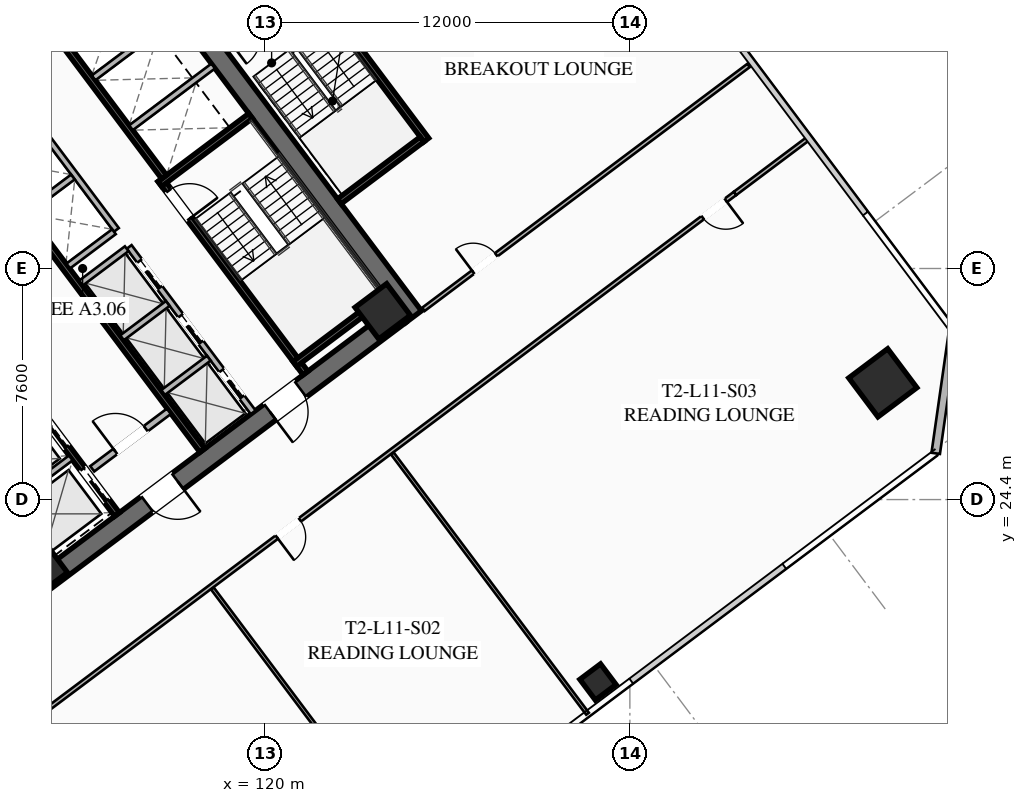
"""IFC4 building model, lengths in metres.
Left out: names, types, materials, properties, quantities, classifications, styles, units other than length and angle.
Written with IfcOpenShell. Run it as: python <this file> out.ifc"""

import sys

from ifc_helpers import new_model, si_unit, direction, frame, frame_2d, origin, origin_2d, place, context, subcontext, project, spatial, rectangle, hollow_rectangle, extrude, element, fill, save


model = new_model("IFC4")
c1 = context("Model", 3, precision=1e-05, world=origin(), true_north=direction((0.0, 1.0)))
c2 = subcontext(c1, "Body", "Model", "MODEL_VIEW")
j1 = project(units=[si_unit("LENGTHUNIT", "METRE"), si_unit("PLANEANGLEUNIT", "RADIAN")], contexts=[c1])
p1 = place(None, origin())
s1 = spatial("IfcSite", under=j1, at=p1, CompositionType="ELEMENT")
p2 = place(p1, origin())
s2 = spatial("IfcBuilding", under=s1, at=p2, CompositionType="ELEMENT")
p3 = place(p2, frame((0.0, 0.0, 45.9)))
s3 = spatial("IfcBuildingStorey", under=s2, at=p3, CompositionType="ELEMENT", Elevation=45.9)
p4 = place(p3, frame((115.524, 42.893, 0.0), z_axis=(0.0, 0.0, 1.0), x_axis=(0.600005007985, -0.799996243986, 0.0)))
e1 = element("IfcWall", 1, at=p4, inside=s3, PredefinedType="SHEAR", context=c2, shape_type="SweptSolid", body=[
    extrude(rectangle(XDim=15.6, YDim=0.65, at=frame_2d((7.8, 0.0))), origin(), (0.0, 0.0, 1.0), 3.55),
])
p5 = place(p3, frame((124.429, 30.478, 0.0), z_axis=(0.0, 0.0, 1.0), x_axis=(-0.799998028465, -0.600002628705, 0.0)))
e2 = element("IfcWall", 2, at=p5, inside=s3, PredefinedType="SHEAR", context=c2, shape_type="SweptSolid", body=[
    extrude(rectangle(XDim=14.86, YDim=0.65, at=frame_2d((7.43, 0.0))), origin(), (0.0, 0.0, 1.0), 3.55),
])
p6 = place(p5, frame((9.13, 0.0, 0.0)))
e3 = element("IfcOpeningElement", 3, at=p6, cuts=e2, PredefinedType="OPENING", context=c2, shape_type="SweptSolid", body=[
    extrude(rectangle(XDim=1.25, YDim=2.25, at=frame_2d((0.625, 1.125))), frame((0.0, 0.335, 0.0), z_axis=(0.0, -1.0, 0.0), x_axis=(1.0, 0.0, 0.0)), (0.0, 0.0, 1.0), 0.67),
])
p7 = place(p5, frame((4.08, 0.0, 0.0)))
e4 = element("IfcOpeningElement", 4, at=p7, cuts=e2, PredefinedType="OPENING", context=c2, shape_type="SweptSolid", body=[
    extrude(rectangle(XDim=1.25, YDim=2.25, at=frame_2d((0.625, 1.125))), frame((0.0, 0.335, 0.0), z_axis=(0.0, -1.0, 0.0), x_axis=(1.0, 0.0, 0.0)), (0.0, 0.0, 1.0), 0.67),
])
p8 = place(p3, frame((103.571, 33.522, 0.0), z_axis=(0.0, 0.0, 1.0), x_axis=(0.799998028465, 0.600002628705, 0.0)))
e5 = element("IfcWall", 5, at=p8, inside=s3, PredefinedType="SHEAR", context=c2, shape_type="SweptSolid", body=[
    extrude(rectangle(XDim=14.86, YDim=0.65, at=frame_2d((7.43, 0.0))), origin(), (0.0, 0.0, 1.0), 3.55),
])
p9 = place(p8, frame((4.48, 0.0, 0.0)))
e6 = element("IfcOpeningElement", 6, at=p9, cuts=e5, PredefinedType="OPENING", context=c2, shape_type="SweptSolid", body=[
    extrude(rectangle(XDim=1.25, YDim=2.25, at=frame_2d((0.625, 1.125))), frame((0.0, 0.335, 0.0), z_axis=(0.0, -1.0, 0.0), x_axis=(1.0, 0.0, 0.0)), (0.0, 0.0, 1.0), 0.67),
])
p10 = place(p8, frame((9.53, 0.0, 0.0)))
e7 = element("IfcOpeningElement", 7, at=p10, cuts=e5, PredefinedType="OPENING", context=c2, shape_type="SweptSolid", body=[
    extrude(rectangle(XDim=1.25, YDim=2.25, at=frame_2d((0.625, 1.125))), frame((0.0, 0.335, 0.0), z_axis=(0.0, -1.0, 0.0), x_axis=(1.0, 0.0, 0.0)), (0.0, 0.0, 1.0), 0.67),
])
for number, where, z_axis, x_axis in (
    (8, (112.59, 22.13, 0.0), (0.0, 0.0, 1.0), (0.8, 0.6, 0.0)),
    (9, (123.87, 30.59, 0.0), (0.0, 0.0, 1.0), (0.8, 0.6, 0.0)),
):
    element("IfcColumn", number, at=place(p3, frame(where, z_axis=z_axis, x_axis=x_axis)), inside=s3, PredefinedType="COLUMN", context=c2, shape_type="SweptSolid", body=[
        extrude(hollow_rectangle(XDim=1.3, YDim=1.3, WallThickness=0.05, at=origin_2d()), origin(), (0.0, 0.0, 1.0), 3.35),
    ])
p11 = place(p3, frame((140.32, 28.24, 0.0), z_axis=(0.0, 0.0, 1.0), x_axis=(0.799999996291, 0.600000004945, 0.0)))
e10 = element("IfcColumn", 10, at=p11, inside=s3, PredefinedType="COLUMN", context=c2, shape_type="SweptSolid", body=[
    extrude(hollow_rectangle(XDim=1.6, YDim=1.6, WallThickness=0.06, at=origin_2d()), origin(), (0.0, 0.0, 1.0), 3.35),
])
p12 = place(p3, frame((130.95, 18.4, 0.0), z_axis=(0.0, 0.0, 1.0), x_axis=(0.799999996291, 0.600000004945, 0.0)))
e11 = element("IfcColumn", 11, at=p12, inside=s3, PredefinedType="COLUMN", context=c2, shape_type="SweptSolid", body=[
    extrude(hollow_rectangle(XDim=0.85, YDim=0.85, WallThickness=0.035, at=origin_2d()), origin(), (0.0, 0.0, 1.0), 3.35),
])
p13 = place(p3, frame((142.64, 29.98, 0.0), z_axis=(0.0, 0.0, 1.0), x_axis=(-0.14137968631, -0.989955445613, 0.0)))
e12 = element("IfcWall", 12, at=p13, inside=s3, PredefinedType="SOLIDWALL", context=c2, shape_type="SweptSolid", body=[
    extrude(rectangle(XDim=4.101, YDim=0.28, at=frame_2d((2.051, 0.0))), origin(), (0.0, 0.0, 1.0), 3.35),
])
p14 = place(p3, frame((116.56, 34.92, 0.0), z_axis=(0.0, 0.0, 1.0), x_axis=(0.600009827119, -0.799992629566, 0.0)))
e13 = element("IfcWall", 13, at=p14, inside=s3, PredefinedType="SHEAR", context=c2, shape_type="SweptSolid", body=[
    extrude(rectangle(XDim=7.95, YDim=0.2, at=frame_2d((3.975, 0.0))), origin(), (0.0, 0.0, 1.0), 3.35),
])
p15 = place(p14, frame((0.45, 0.0, 0.0)))
e14 = element("IfcOpeningElement", 14, at=p15, cuts=e13, PredefinedType="OPENING", context=c2, shape_type="SweptSolid", body=[
    extrude(rectangle(XDim=1.15, YDim=2.2, at=frame_2d((0.575, 1.1))), frame((0.0, 0.11, 0.0), z_axis=(0.0, -1.0, 0.0), x_axis=(1.0, 0.0, 0.0)), (0.0, 0.0, 1.0), 0.22),
])
for number, where, z_axis, x_axis in (
    (15, (116.54, 34.78, 0.0), (0.0, 0.0, 1.0), (0.8, 0.6, 0.0)),
    (16, (120.98, 28.86, 0.0), (0.0, 0.0, 1.0), (0.8, 0.6, 0.0)),
):
    element("IfcWall", number, at=place(p3, frame(where, z_axis=z_axis, x_axis=x_axis)), inside=s3, PredefinedType="SHEAR", context=c2, shape_type="SweptSolid", body=[
        extrude(rectangle(XDim=3.73, YDim=0.2, at=frame_2d((1.865, 0.0))), origin(), (0.0, 0.0, 1.0), 3.35),
    ])
p16 = place(p3, frame((117.938, 26.016, 0.0), z_axis=(0.0, 0.0, 1.0), x_axis=(-0.600005463273, 0.799995902516, 0.0)))
e17 = element("IfcWall", 17, at=p16, inside=s3, PredefinedType="SHEAR", context=c2, shape_type="SweptSolid", body=[
    extrude(rectangle(XDim=14.3, YDim=0.2, at=frame_2d((7.15, 0.0))), origin(), (0.0, 0.0, 1.0), 3.35),
])
p17 = place(p3, frame((114.316, 25.412, 0.0), z_axis=(0.0, 0.0, 1.0), x_axis=(0.800018601094, 0.59997519774, 0.0)))
e18 = element("IfcWall", 18, at=p17, inside=s3, PredefinedType="SOLIDWALL", context=c2, shape_type="SweptSolid", body=[
    extrude(rectangle(XDim=3.15, YDim=0.22, at=frame_2d((1.575, 0.0))), origin(), (0.0, 0.0, 1.0), 2.703),
])
p18 = place(p17, frame((0.95, 0.0, 0.0)))
e19 = element("IfcOpeningElement", 19, at=p18, cuts=e18, PredefinedType="OPENING", context=c2, shape_type="SweptSolid", body=[
    extrude(rectangle(XDim=1.25, YDim=2.25, at=frame_2d((0.625, 1.125))), frame((0.0, 0.12, 0.0), z_axis=(0.0, -1.0, 0.0), x_axis=(1.0, 0.0, 0.0)), (0.0, 0.0, 1.0), 0.24),
])
p19 = place(p3, frame((115.13, 23.91, 0.0), z_axis=(0.0, 0.0, 1.0), x_axis=(-0.599975393228, 0.800018454488, 0.0)))
e20 = element("IfcWall", 20, at=p19, inside=s3, PredefinedType="SHEAR", context=c2, shape_type="SweptSolid", body=[
    extrude(rectangle(XDim=6.35, YDim=0.2, at=frame_2d((3.175, 0.0))), origin(), (0.0, 0.0, 1.0), 3.35),
])
p20 = place(p19, frame((4.775, 0.0, 0.0)))
e21 = element("IfcOpeningElement", 21, at=p20, cuts=e20, PredefinedType="OPENING", context=c2, shape_type="SweptSolid", body=[
    extrude(rectangle(XDim=1.3, YDim=2.25, at=frame_2d((0.65, 1.125))), frame((0.0, 0.11, 0.0), z_axis=(0.0, -1.0, 0.0), x_axis=(1.0, 0.0, 0.0)), (0.0, 0.0, 1.0), 0.22),
])
p21 = place(p19, frame((2.775, 0.0, 0.0)))
e22 = element("IfcOpeningElement", 22, at=p21, cuts=e20, PredefinedType="OPENING", context=c2, shape_type="SweptSolid", body=[
    extrude(rectangle(XDim=1.3, YDim=2.25, at=frame_2d((0.65, 1.125))), frame((0.0, 0.11, 0.0), z_axis=(0.0, -1.0, 0.0), x_axis=(1.0, 0.0, 0.0)), (0.0, 0.0, 1.0), 0.22),
])
p22 = place(p19, frame((0.575, 0.0, 0.0)))
e23 = element("IfcOpeningElement", 23, at=p22, cuts=e20, PredefinedType="OPENING", context=c2, shape_type="SweptSolid", body=[
    extrude(rectangle(XDim=1.3, YDim=2.25, at=frame_2d((0.65, 1.125))), frame((0.0, 0.11, 0.0), z_axis=(0.0, -1.0, 0.0), x_axis=(1.0, 0.0, 0.0)), (0.0, 0.0, 1.0), 0.22),
])
p23 = place(p3, frame((110.906, 23.742, 0.0), z_axis=(0.0, 0.0, 1.0), x_axis=(0.8, 0.6, 0.0)))
e24 = element("IfcWall", 24, at=p23, inside=s3, PredefinedType="SOLIDWALL", context=c2, shape_type="SweptSolid", body=[
    extrude(rectangle(XDim=3.38, YDim=0.2, at=frame_2d((1.69, 0.0))), origin(), (0.0, 0.0, 1.0), 3.35),
])
p24 = place(p3, frame((112.87, 40.09, 0.0), z_axis=(0.0, 0.0, 1.0), x_axis=(0.599975393228, -0.800018454488, 0.0)))
e25 = element("IfcWall", 25, at=p24, inside=s3, PredefinedType="SHEAR", context=c2, shape_type="SweptSolid", body=[
    extrude(rectangle(XDim=6.35, YDim=0.2, at=frame_2d((3.175, 0.0))), origin(), (0.0, 0.0, 1.0), 3.35),
])
for number, where, z_axis, x_axis in (
    (26, (115.59, 36.63, 0.0), (0.0, 0.0, 1.0), (0.8, 0.6, 0.0)),
    (27, (114.36, 38.27, 0.0), (0.0, 0.0, 1.0), (0.8, 0.6, 0.0)),
):
    element("IfcWall", number, at=place(p3, frame(where, z_axis=z_axis, x_axis=x_axis)), inside=s3, PredefinedType="SOLIDWALL", context=c2, shape_type="SweptSolid", body=[
        extrude(rectangle(XDim=3.38, YDim=0.2, at=frame_2d((1.69, 0.0))), origin(), (0.0, 0.0, 1.0), 3.35),
    ])
p25 = place(p3, frame((119.61, 27.27, 0.0), z_axis=(0.0, 0.0, 1.0), x_axis=(-0.600011488909, 0.79999138319, 0.0)))
e28 = element("IfcWall", 28, at=p25, inside=s3, PredefinedType="SOLIDWALL", context=c2, shape_type="SweptSolid", body=[
    extrude(rectangle(XDim=6.8, YDim=0.2, at=frame_2d((3.4, 0.0))), origin(), (0.0, 0.0, 1.0), 3.35),
])
p26 = place(p25, frame((0.625, 0.0, 0.0)))
e29 = element("IfcOpeningElement", 29, at=p26, cuts=e28, PredefinedType="OPENING", context=c2, shape_type="SweptSolid", body=[
    extrude(rectangle(XDim=1.1, YDim=2.2, at=frame_2d((0.55, 1.1))), frame((0.0, 0.11, 0.0), z_axis=(0.0, -1.0, 0.0), x_axis=(1.0, 0.0, 0.0)), (0.0, 0.0, 1.0), 0.22),
])
p27 = place(p25, frame((2.875, 0.0, 0.0)))
e30 = element("IfcOpeningElement", 30, at=p27, cuts=e28, PredefinedType="OPENING", context=c2, shape_type="SweptSolid", body=[
    extrude(rectangle(XDim=1.1, YDim=2.2, at=frame_2d((0.55, 1.1))), frame((0.0, 0.11, 0.0), z_axis=(0.0, -1.0, 0.0), x_axis=(1.0, 0.0, 0.0)), (0.0, 0.0, 1.0), 0.22),
])
p28 = place(p25, frame((5.125, 0.0, 0.0)))
e31 = element("IfcOpeningElement", 31, at=p28, cuts=e28, PredefinedType="OPENING", context=c2, shape_type="SweptSolid", body=[
    extrude(rectangle(XDim=1.1, YDim=2.2, at=frame_2d((0.55, 1.1))), frame((0.0, 0.11, 0.0), z_axis=(0.0, -1.0, 0.0), x_axis=(1.0, 0.0, 0.0)), (0.0, 0.0, 1.0), 0.22),
])
p29 = place(p3, frame((116.646, 27.922, 0.0), z_axis=(0.0, 0.0, 1.0), x_axis=(0.8, 0.6, 0.0)))
e32 = element("IfcWall", 32, at=p29, inside=s3, PredefinedType="SOLIDWALL", context=c2, shape_type="SweptSolid", body=[
    extrude(rectangle(XDim=1.88, YDim=0.2, at=frame_2d((0.94, 0.0))), origin(), (0.0, 0.0, 1.0), 3.35),
])
p30 = place(p3, frame((115.296, 29.722, 0.0), z_axis=(0.0, 0.0, 1.0), x_axis=(0.799984418148, 0.600020775241, 0.0)))
e33 = element("IfcWall", 33, at=p30, inside=s3, PredefinedType="SOLIDWALL", context=c2, shape_type="SweptSolid", body=[
    extrude(rectangle(XDim=1.88, YDim=0.2, at=frame_2d((0.94, 0.0))), origin(), (0.0, 0.0, 1.0), 3.35),
])
p31 = place(p3, frame((113.946, 31.522, 0.0), z_axis=(0.0, 0.0, 1.0), x_axis=(0.8, 0.6, 0.0)))
e34 = element("IfcWall", 34, at=p31, inside=s3, PredefinedType="SOLIDWALL", context=c2, shape_type="SweptSolid", body=[
    extrude(rectangle(XDim=1.88, YDim=0.2, at=frame_2d((0.94, 0.0))), origin(), (0.0, 0.0, 1.0), 3.35),
])
p32 = place(p3, frame((115.11, 33.27, 0.0), z_axis=(0.0, 0.0, 1.0), x_axis=(-0.600011488909, 0.79999138319, 0.0)))
e35 = element("IfcWall", 35, at=p32, inside=s3, PredefinedType="SOLIDWALL", context=c2, shape_type="SweptSolid", body=[
    extrude(rectangle(XDim=6.8, YDim=0.2, at=frame_2d((3.4, 0.0))), origin(), (0.0, 0.0, 1.0), 3.35),
])
p33 = place(p3, frame((113.526, 32.082, 0.0), z_axis=(0.0, 0.0, 1.0), x_axis=(0.800046745961, 0.599937666993, 0.0)))
e36 = element("IfcWall", 36, at=p33, inside=s3, PredefinedType="SOLIDWALL", context=c2, shape_type="SweptSolid", body=[
    extrude(rectangle(XDim=1.88, YDim=0.2, at=frame_2d((0.94, 0.0))), origin(), (0.0, 0.0, 1.0), 3.35),
])
p34 = place(p3, frame((112.176, 33.882, 0.0), z_axis=(0.0, 0.0, 1.0), x_axis=(0.8, 0.6, 0.0)))
e37 = element("IfcWall", 37, at=p34, inside=s3, PredefinedType="SOLIDWALL", context=c2, shape_type="SweptSolid", body=[
    extrude(rectangle(XDim=1.88, YDim=0.2, at=frame_2d((0.94, 0.0))), origin(), (0.0, 0.0, 1.0), 3.35),
])
p35 = place(p3, frame((125.304, 36.228, 0.0), z_axis=(0.0, 0.0, 1.0), x_axis=(-0.59998851072, 0.800008616831, 0.0)))
e38 = element("IfcWall", 38, at=p35, inside=s3, PredefinedType="SHEAR", context=c2, shape_type="SweptSolid", body=[
    extrude(rectangle(XDim=6.8, YDim=0.2, at=frame_2d((3.4, 0.0))), origin(), (0.0, 0.0, 1.0), 3.35),
])
p36 = place(p3, frame((122.444, 34.208, 0.0), z_axis=(0.0, 0.0, 1.0), x_axis=(0.79999138319, 0.600011488909, 0.0)))
e39 = element("IfcWall", 39, at=p36, inside=s3, PredefinedType="SHEAR", context=c2, shape_type="SweptSolid", body=[
    extrude(rectangle(XDim=3.4, YDim=0.2, at=frame_2d((1.7, 0.0))), origin(), (0.0, 0.0, 1.0), 3.35),
])
p37 = place(p3, frame((98.516, 34.012, 0.0), z_axis=(0.0, 0.0, 1.0), x_axis=(0.799998035726, 0.600002619023, 0.0)))
e40 = element("IfcWall", 40, at=p37, inside=s3, PredefinedType="PARTITIONING", context=c2, shape_type="SweptSolid", body=[
    extrude(rectangle(XDim=29.83, YDim=0.135, at=frame_2d((14.915, 0.0))), origin(), (0.0, 0.0, 1.0), 2.703),
])
p38 = place(p37, frame((0.3, 0.0, 0.0)))
e41 = element("IfcOpeningElement", 41, at=p38, cuts=e40, PredefinedType="OPENING", context=c2, shape_type="SweptSolid", body=[
    extrude(rectangle(XDim=0.95, YDim=2.05, at=frame_2d((0.475, 1.025))), frame((0.0, 0.077, 0.0), z_axis=(0.0, -1.0, 0.0), x_axis=(1.0, 0.0, 0.0)), (0.0, 0.0, 1.0), 0.155),
])
p39 = place(p37, frame((10.835, 0.0, 0.0)))
e42 = element("IfcOpeningElement", 42, at=p39, cuts=e40, PredefinedType="OPENING", context=c2, shape_type="SweptSolid", body=[
    extrude(rectangle(XDim=0.95, YDim=2.05, at=frame_2d((0.475, 1.025))), frame((0.0, 0.077, 0.0), z_axis=(0.0, -1.0, 0.0), x_axis=(1.0, 0.0, 0.0)), (0.0, 0.0, 1.0), 0.155),
])
p40 = place(p37, frame((14.879, 0.0, 0.0)))
e43 = element("IfcOpeningElement", 43, at=p40, cuts=e40, PredefinedType="OPENING", context=c2, shape_type="SweptSolid", body=[
    extrude(rectangle(XDim=0.95, YDim=2.05, at=frame_2d((0.475, 1.025))), frame((0.0, 0.077, 0.0), z_axis=(0.0, -1.0, 0.0), x_axis=(1.0, 0.0, 0.0)), (0.0, 0.0, 1.0), 0.155),
])
p41 = place(p37, frame((28.58, 0.0, 0.0)))
e44 = element("IfcOpeningElement", 44, at=p41, cuts=e40, PredefinedType="OPENING", context=c2, shape_type="SweptSolid", body=[
    extrude(rectangle(XDim=0.95, YDim=2.05, at=frame_2d((0.475, 1.025))), frame((0.0, 0.077, 0.0), z_axis=(0.0, -1.0, 0.0), x_axis=(1.0, 0.0, 0.0)), (0.0, 0.0, 1.0), 0.155),
])
p42 = place(p3, frame((135.46, 34.47, 0.0), z_axis=(0.0, 0.0, 1.0), x_axis=(-0.800000982127, -0.599998690494, 0.0)))
e45 = element("IfcWall", 45, at=p42, inside=s3, PredefinedType="PARTITIONING", context=c2, shape_type="SweptSolid", body=[
    extrude(rectangle(XDim=29.83, YDim=0.135, at=frame_2d((14.915, 0.0))), origin(), (0.0, 0.0, 1.0), 2.703),
])
p43 = place(p42, frame((28.5, 0.0, 0.0)))
e46 = element("IfcOpeningElement", 46, at=p43, cuts=e45, PredefinedType="OPENING", context=c2, shape_type="SweptSolid", body=[
    extrude(rectangle(XDim=0.95, YDim=2.05, at=frame_2d((0.475, 1.025))), frame((0.0, 0.077, 0.0), z_axis=(0.0, -1.0, 0.0), x_axis=(1.0, 0.0, 0.0)), (0.0, 0.0, 1.0), 0.155),
])
p44 = place(p42, frame((17.892, 0.0, 0.0)))
e47 = element("IfcOpeningElement", 47, at=p44, cuts=e45, PredefinedType="OPENING", context=c2, shape_type="SweptSolid", body=[
    extrude(rectangle(XDim=0.95, YDim=2.05, at=frame_2d((0.475, 1.025))), frame((0.0, 0.077, 0.0), z_axis=(0.0, -1.0, 0.0), x_axis=(1.0, 0.0, 0.0)), (0.0, 0.0, 1.0), 0.155),
])
p45 = place(p42, frame((0.38, 0.0, 0.0)))
e48 = element("IfcOpeningElement", 48, at=p45, cuts=e45, PredefinedType="OPENING", context=c2, shape_type="SweptSolid", body=[
    extrude(rectangle(XDim=0.95, YDim=2.05, at=frame_2d((0.475, 1.025))), frame((0.0, 0.077, 0.0), z_axis=(0.0, -1.0, 0.0), x_axis=(1.0, 0.0, 0.0)), (0.0, 0.0, 1.0), 0.155),
])
p46 = place(p3, frame((135.46, 34.47, 0.0), z_axis=(0.0, 0.0, 1.0), x_axis=(0.799990331366, 0.600012891296, 0.0)))
e49 = element("IfcWall", 49, at=p46, inside=s3, PredefinedType="PARTITIONING", context=c2, shape_type="SweptSolid", body=[
    extrude(rectangle(XDim=3.03, YDim=0.135, at=frame_2d((1.515, 0.0))), origin(), (0.0, 0.0, 1.0), 2.703),
])
for number, where, z_axis, x_axis in (
    (50, (124.688, 12.916, 0.0), (0.0, 0.0, 1.0), (-0.6, 0.8, 0.0)),
    (51, (130.608, 17.356, 0.0), (0.0, 0.0, 1.0), (-0.6, 0.8, 0.0)),
):
    element("IfcWall", number, at=place(p3, frame(where, z_axis=z_axis, x_axis=x_axis)), inside=s3, PredefinedType="PARTITIONING", context=c2, shape_type="SweptSolid", body=[
        extrude(rectangle(XDim=10.7, YDim=0.11, at=frame_2d((5.35, 0.0))), origin(), (0.0, 0.0, 1.0), 2.703),
    ])
p47 = place(p3, frame((125.208, 30.656, 0.0), z_axis=(0.0, 0.0, 1.0), x_axis=(0.800002191231, 0.599997078347, 0.0)))
e52 = element("IfcWall", 52, at=p47, inside=s3, PredefinedType="PARTITIONING", context=c2, shape_type="SweptSolid", body=[
    extrude(rectangle(XDim=13.37, YDim=0.135, at=frame_2d((6.685, 0.0))), origin(), (0.0, 0.0, 1.0), 2.703),
])
p48 = place(p47, frame((2.045, 0.0, 0.0)))
e53 = element("IfcOpeningElement", 53, at=p48, cuts=e52, PredefinedType="OPENING", context=c2, shape_type="SweptSolid", body=[
    extrude(rectangle(XDim=0.95, YDim=2.05, at=frame_2d((0.475, 1.025))), frame((0.0, 0.077, 0.0), z_axis=(0.0, -1.0, 0.0), x_axis=(1.0, 0.0, 0.0)), (0.0, 0.0, 1.0), 0.155),
])
p49 = place(p6, origin())
e54 = element("IfcDoor", 54, at=p49, inside=s3, OperationType="SINGLE_SWING_LEFT", PredefinedType="DOOR", context=c2, shape_type="SweptSolid", body=[
    extrude(rectangle(XDim=1.25, YDim=2.25, at=frame_2d((0.625, 1.125))), frame((0.0, 0.025, 0.0), z_axis=(0.0, -1.0, 0.0), x_axis=(1.0, 0.0, 0.0)), (0.0, 0.0, 1.0), 0.05),
])
fill(e3, e54)
p50 = place(p7, origin())
e55 = element("IfcDoor", 55, at=p50, inside=s3, OperationType="SINGLE_SWING_RIGHT", PredefinedType="DOOR", context=c2, shape_type="SweptSolid", body=[
    extrude(rectangle(XDim=1.25, YDim=2.25, at=frame_2d((0.625, 1.125))), frame((0.0, 0.025, 0.0), z_axis=(0.0, -1.0, 0.0), x_axis=(1.0, 0.0, 0.0)), (0.0, 0.0, 1.0), 0.05),
])
fill(e4, e55)
p51 = place(p15, origin())
e56 = element("IfcDoor", 56, at=p51, inside=s3, OperationType="SINGLE_SWING_RIGHT", PredefinedType="DOOR", context=c2, shape_type="SweptSolid", body=[
    extrude(rectangle(XDim=1.15, YDim=2.2, at=frame_2d((0.575, 1.1))), frame((0.0, 0.025, 0.0), z_axis=(0.0, -1.0, 0.0), x_axis=(1.0, 0.0, 0.0)), (0.0, 0.0, 1.0), 0.05),
])
fill(e14, e56)
p52 = place(p18, origin())
e57 = element("IfcDoor", 57, at=p52, inside=s3, OperationType="SINGLE_SWING_LEFT", PredefinedType="DOOR", context=c2, shape_type="SweptSolid", body=[
    extrude(rectangle(XDim=1.25, YDim=2.25, at=frame_2d((0.625, 1.125))), frame((0.0, 0.025, 0.0), z_axis=(0.0, -1.0, 0.0), x_axis=(1.0, 0.0, 0.0)), (0.0, 0.0, 1.0), 0.05),
])
fill(e19, e57)
p53 = place(p44, origin())
e58 = element("IfcDoor", 58, at=p53, inside=s3, OperationType="SINGLE_SWING_RIGHT", PredefinedType="DOOR", context=c2, shape_type="SweptSolid", body=[
    extrude(rectangle(XDim=0.95, YDim=2.05, at=frame_2d((0.475, 1.025))), frame((0.0, 0.025, 0.0), z_axis=(0.0, -1.0, 0.0), x_axis=(1.0, 0.0, 0.0)), (0.0, 0.0, 1.0), 0.05),
])
fill(e47, e58)
p54 = place(p45, origin())
e59 = element("IfcDoor", 59, at=p54, inside=s3, OperationType="SINGLE_SWING_LEFT", PredefinedType="DOOR", context=c2, shape_type="SweptSolid", body=[
    extrude(rectangle(XDim=0.95, YDim=2.05, at=frame_2d((0.475, 1.025))), frame((0.0, 0.025, 0.0), z_axis=(0.0, -1.0, 0.0), x_axis=(1.0, 0.0, 0.0)), (0.0, 0.0, 1.0), 0.05),
])
fill(e48, e59)
p55 = place(p48, origin())
e60 = element("IfcDoor", 60, at=p55, inside=s3, OperationType="SINGLE_SWING_LEFT", PredefinedType="DOOR", context=c2, shape_type="SweptSolid", body=[
    extrude(rectangle(XDim=0.95, YDim=2.05, at=frame_2d((0.475, 1.025))), frame((0.0, 0.025, 0.0), z_axis=(0.0, -1.0, 0.0), x_axis=(1.0, 0.0, 0.0)), (0.0, 0.0, 1.0), 0.05),
])
fill(e53, e60)
p56 = place(p21, origin())
e61 = element("IfcDoor", 61, at=p56, inside=s3, OperationType="SLIDING_TO_LEFT", PredefinedType="DOOR", context=c2, shape_type="SweptSolid", body=[
    extrude(rectangle(XDim=1.3, YDim=2.25, at=frame_2d((0.65, 1.125))), frame((0.0, 0.025, 0.0), z_axis=(0.0, -1.0, 0.0), x_axis=(1.0, 0.0, 0.0)), (0.0, 0.0, 1.0), 0.05),
])
fill(e22, e61)
p57 = place(p22, origin())
e62 = element("IfcDoor", 62, at=p57, inside=s3, OperationType="SLIDING_TO_LEFT", PredefinedType="DOOR", context=c2, shape_type="SweptSolid", body=[
    extrude(rectangle(XDim=1.3, YDim=2.25, at=frame_2d((0.65, 1.125))), frame((0.0, 0.025, 0.0), z_axis=(0.0, -1.0, 0.0), x_axis=(1.0, 0.0, 0.0)), (0.0, 0.0, 1.0), 0.05),
])
fill(e23, e62)
p58 = place(p26, origin())
e63 = element("IfcDoor", 63, at=p58, inside=s3, OperationType="SLIDING_TO_LEFT", PredefinedType="DOOR", context=c2, shape_type="SweptSolid", body=[
    extrude(rectangle(XDim=1.1, YDim=2.2, at=frame_2d((0.55, 1.1))), frame((0.0, 0.025, 0.0), z_axis=(0.0, -1.0, 0.0), x_axis=(1.0, 0.0, 0.0)), (0.0, 0.0, 1.0), 0.05),
])
fill(e29, e63)
p59 = place(p27, origin())
e64 = element("IfcDoor", 64, at=p59, inside=s3, OperationType="SLIDING_TO_LEFT", PredefinedType="DOOR", context=c2, shape_type="SweptSolid", body=[
    extrude(rectangle(XDim=1.1, YDim=2.2, at=frame_2d((0.55, 1.1))), frame((0.0, 0.025, 0.0), z_axis=(0.0, -1.0, 0.0), x_axis=(1.0, 0.0, 0.0)), (0.0, 0.0, 1.0), 0.05),
])
fill(e30, e64)
p60 = place(p28, origin())
e65 = element("IfcDoor", 65, at=p60, inside=s3, OperationType="SLIDING_TO_LEFT", PredefinedType="DOOR", context=c2, shape_type="SweptSolid", body=[
    extrude(rectangle(XDim=1.1, YDim=2.2, at=frame_2d((0.55, 1.1))), frame((0.0, 0.025, 0.0), z_axis=(0.0, -1.0, 0.0), x_axis=(1.0, 0.0, 0.0)), (0.0, 0.0, 1.0), 0.05),
])
fill(e31, e65)
save(model, sys.argv[1])
